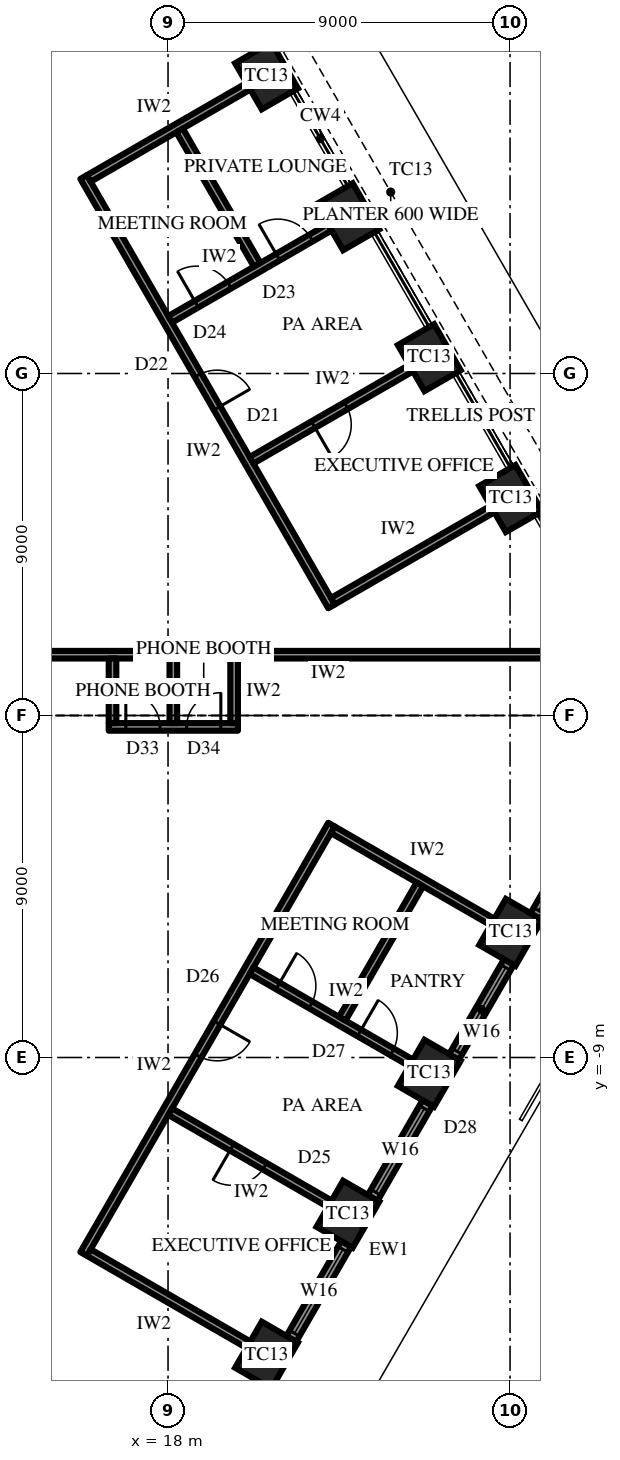
"""IFC4 building model, lengths in metres.
Left out: names, types, materials, properties, quantities, classifications, styles, units other than length and angle.
Written with IfcOpenShell. Run it as: python <this file> out.ifc"""

import sys

from ifc_helpers import new_model, si_unit, direction, frame, frame_2d, origin, origin_2d, place, context, subcontext, project, spatial, rectangle, extrude, element, fill, save


model = new_model("IFC4")
c1 = context("Model", 3, precision=1e-05, world=origin(), true_north=direction((0.0, 1.0)))
c2 = subcontext(c1, "Body", "Model", "MODEL_VIEW")
j1 = project(units=[si_unit("LENGTHUNIT", "METRE"), si_unit("PLANEANGLEUNIT", "RADIAN")], contexts=[c1])
p1 = place(None, origin())
s1 = spatial("IfcSite", under=j1, at=p1, CompositionType="ELEMENT")
p2 = place(p1, origin())
s2 = spatial("IfcBuilding", under=s1, at=p2, CompositionType="ELEMENT")
p3 = place(p2, frame((0.0, 0.0, 319.9)))
s3 = spatial("IfcBuildingStorey", under=s2, at=p3, CompositionType="ELEMENT", Elevation=319.9)
for number, where, z_axis, x_axis in (
    (1, (27.015, 5.708, 0.0), (0.0, 0.0, 1.0), (-0.5, 0.866, 0.0)),
    (2, (24.874, 9.417, 0.0), (0.0, 0.0, 1.0), (-0.5, 0.866, 0.0)),
    (3, (22.733, 13.125, 0.0), (0.0, 0.0, 1.0), (-0.5, 0.866, 0.0)),
    (4, (20.592, 16.833, 0.0), (0.0, 0.0, 1.0), (-0.5, 0.866, 0.0)),
    (5, (20.592, -16.833, 0.0), (0.0, 0.0, 1.0), (0.5, 0.866, 0.0)),
    (6, (22.733, -13.125, 0.0), (0.0, 0.0, 1.0), (0.5, 0.866, 0.0)),
    (7, (24.874, -9.417, 0.0), (0.0, 0.0, 1.0), (0.5, 0.866, 0.0)),
    (8, (27.015, -5.708, 0.0), (0.0, 0.0, 1.0), (0.5, 0.866, 0.0)),
):
    element("IfcColumn", number, at=place(p3, frame(where, z_axis=z_axis, x_axis=x_axis)), inside=s3, PredefinedType="COLUMN", context=c2, shape_type="SweptSolid", body=[
        extrude(rectangle(XDim=1.4, YDim=1.1, at=origin_2d()), origin(), (0.0, 0.0, 1.0), 4.2),
    ])
p4 = place(p3, frame((16.613, -24.425, 0.0), z_axis=(0.0, 0.0, 1.0), x_axis=(0.499997191038, 0.866027025533, 0.0)))
e9 = element("IfcWall", 9, at=p4, inside=s3, PredefinedType="SOLIDWALL", context=c2, shape_type="SweptSolid", body=[
    extrude(rectangle(XDim=25.692, YDim=0.3, at=frame_2d((12.846, 0.0))), origin(), (0.0, 0.0, 1.0), 2.0),
])
p5 = place(p4, frame((0.866, 0.0, 0.6)))
e10 = element("IfcOpeningElement", 10, at=p5, cuts=e9, PredefinedType="OPENING", context=c2, shape_type="SweptSolid", body=[
    extrude(rectangle(XDim=2.55, YDim=1.15, at=frame_2d((1.275, 0.575))), frame((0.0, 0.16, 0.0), z_axis=(0.0, -1.0, 0.0), x_axis=(1.0, 0.0, 0.0)), (0.0, 0.0, 1.0), 0.32),
])
p6 = place(p4, frame((5.148, 0.0, 0.6)))
e11 = element("IfcOpeningElement", 11, at=p6, cuts=e9, PredefinedType="OPENING", context=c2, shape_type="SweptSolid", body=[
    extrude(rectangle(XDim=2.55, YDim=1.15, at=frame_2d((1.275, 0.575))), frame((0.0, 0.16, 0.0), z_axis=(0.0, -1.0, 0.0), x_axis=(1.0, 0.0, 0.0)), (0.0, 0.0, 1.0), 0.32),
])
p7 = place(p4, frame((9.43, 0.0, 0.6)))
e12 = element("IfcOpeningElement", 12, at=p7, cuts=e9, PredefinedType="OPENING", context=c2, shape_type="SweptSolid", body=[
    extrude(rectangle(XDim=2.55, YDim=1.15, at=frame_2d((1.275, 0.575))), frame((0.0, 0.16, 0.0), z_axis=(0.0, -1.0, 0.0), x_axis=(1.0, 0.0, 0.0)), (0.0, 0.0, 1.0), 0.32),
])
p8 = place(p4, frame((13.712, 0.0, 0.6)))
e13 = element("IfcOpeningElement", 13, at=p8, cuts=e9, PredefinedType="OPENING", context=c2, shape_type="SweptSolid", body=[
    extrude(rectangle(XDim=2.55, YDim=1.15, at=frame_2d((1.275, 0.575))), frame((0.0, 0.16, 0.0), z_axis=(0.0, -1.0, 0.0), x_axis=(1.0, 0.0, 0.0)), (0.0, 0.0, 1.0), 0.32),
])
p9 = place(p4, frame((17.994, 0.0, 0.6)))
e14 = element("IfcOpeningElement", 14, at=p9, cuts=e9, PredefinedType="OPENING", context=c2, shape_type="SweptSolid", body=[
    extrude(rectangle(XDim=2.55, YDim=1.15, at=frame_2d((1.275, 0.575))), frame((0.0, 0.16, 0.0), z_axis=(0.0, -1.0, 0.0), x_axis=(1.0, 0.0, 0.0)), (0.0, 0.0, 1.0), 0.32),
])
p10 = place(p4, frame((22.276, 0.0, 0.6)))
e15 = element("IfcOpeningElement", 15, at=p10, cuts=e9, PredefinedType="OPENING", context=c2, shape_type="SweptSolid", body=[
    extrude(rectangle(XDim=2.55, YDim=1.15, at=frame_2d((1.275, 0.575))), frame((0.0, 0.16, 0.0), z_axis=(0.0, -1.0, 0.0), x_axis=(1.0, 0.0, 0.0)), (0.0, 0.0, 1.0), 0.32),
])
p11 = place(p3, frame((22.302, 2.872, 0.0), z_axis=(0.0, 0.0, 1.0), x_axis=(-0.499999460936, 0.866025715013, 0.0)))
e16 = element("IfcWall", 16, at=p11, inside=s3, PredefinedType="PARTITIONING", context=c2, shape_type="SweptSolid", body=[
    extrude(rectangle(XDim=13.046, YDim=0.2, at=frame_2d((6.523, 0.0))), origin(), (0.0, 0.0, 1.0), 4.0),
])
p12 = place(p11, frame((6.023, 0.0, 0.0)))
e17 = element("IfcOpeningElement", 17, at=p12, cuts=e16, PredefinedType="OPENING", context=c2, shape_type="SweptSolid", body=[
    extrude(rectangle(XDim=1.0, YDim=2.2, at=frame_2d((0.5, 1.1))), frame((0.0, 0.11, 0.0), z_axis=(0.0, -1.0, 0.0), x_axis=(1.0, 0.0, 0.0)), (0.0, 0.0, 1.0), 0.22),
])
p13 = place(p3, frame((22.339, 3.008, 0.0), z_axis=(0.0, 0.0, 1.0), x_axis=(0.866019606374, 0.500010041276, 0.0)))
e18 = element("IfcWall", 18, at=p13, inside=s3, PredefinedType="PARTITIONING", context=c2, shape_type="SweptSolid", body=[
    extrude(rectangle(XDim=4.85, YDim=0.2, at=frame_2d((2.425, 0.0))), origin(), (0.0, 0.0, 1.0), 3.082),
])
p14 = place(p3, frame((20.198, 6.717, 0.0), z_axis=(0.0, 0.0, 1.0), x_axis=(0.866019606374, 0.500010041276, 0.0)))
e19 = element("IfcWall", 19, at=p14, inside=s3, PredefinedType="PARTITIONING", context=c2, shape_type="SweptSolid", body=[
    extrude(rectangle(XDim=4.85, YDim=0.2, at=frame_2d((2.425, 0.0))), origin(), (0.0, 0.0, 1.0), 2.992),
])
p15 = place(p14, frame((1.875, 0.0, 0.0)))
e20 = element("IfcOpeningElement", 20, at=p15, cuts=e19, PredefinedType="OPENING", context=c2, shape_type="SweptSolid", body=[
    extrude(rectangle(XDim=1.0, YDim=2.2, at=frame_2d((0.5, 1.1))), frame((0.0, 0.11, 0.0), z_axis=(0.0, -1.0, 0.0), x_axis=(1.0, 0.0, 0.0)), (0.0, 0.0, 1.0), 0.22),
])
p16 = place(p3, frame((18.057, 10.425, 0.0), z_axis=(0.0, 0.0, 1.0), x_axis=(0.866019606374, 0.500010041276, 0.0)))
e21 = element("IfcWall", 21, at=p16, inside=s3, PredefinedType="PARTITIONING", context=c2, shape_type="SweptSolid", body=[
    extrude(rectangle(XDim=4.85, YDim=0.2, at=frame_2d((2.425, 0.0))), origin(), (0.0, 0.0, 1.0), 3.082),
])
p17 = place(p16, frame((0.8, 0.0, 0.0)))
e22 = element("IfcOpeningElement", 22, at=p17, cuts=e21, PredefinedType="OPENING", context=c2, shape_type="SweptSolid", body=[
    extrude(rectangle(XDim=1.0, YDim=2.2, at=frame_2d((0.5, 1.1))), frame((0.0, 0.11, 0.0), z_axis=(0.0, -1.0, 0.0), x_axis=(1.0, 0.0, 0.0)), (0.0, 0.0, 1.0), 0.22),
])
p18 = place(p16, frame((3.275, 0.0, 0.0)))
e23 = element("IfcOpeningElement", 23, at=p18, cuts=e21, PredefinedType="OPENING", context=c2, shape_type="SweptSolid", body=[
    extrude(rectangle(XDim=1.0, YDim=2.2, at=frame_2d((0.5, 1.1))), frame((0.0, 0.11, 0.0), z_axis=(0.0, -1.0, 0.0), x_axis=(1.0, 0.0, 0.0)), (0.0, 0.0, 1.0), 0.22),
])
p19 = place(p3, frame((15.916, 14.133, 0.0), z_axis=(0.0, 0.0, 1.0), x_axis=(0.866032190624, 0.499988244665, 0.0)))
e24 = element("IfcWall", 24, at=p19, inside=s3, PredefinedType="PARTITIONING", context=c2, shape_type="SweptSolid", body=[
    extrude(rectangle(XDim=4.85, YDim=0.2, at=frame_2d((2.425, 0.0))), origin(), (0.0, 0.0, 1.0), 3.082),
])
p20 = place(p3, frame((20.345, 11.862, 0.0), z_axis=(0.0, 0.0, 1.0), x_axis=(-0.499998569178, 0.866026229868, 0.0)))
e25 = element("IfcWall", 25, at=p20, inside=s3, PredefinedType="PARTITIONING", context=c2, shape_type="SweptSolid", body=[
    extrude(rectangle(XDim=4.082, YDim=0.2, at=frame_2d((2.041, 0.0))), origin(), (0.0, 0.0, 1.0), 4.0),
])
p21 = place(p3, frame((15.779, -14.17, 0.0), z_axis=(0.0, 0.0, 1.0), x_axis=(0.499999460936, 0.866025715013, 0.0)))
e26 = element("IfcWall", 26, at=p21, inside=s3, PredefinedType="PARTITIONING", context=c2, shape_type="SweptSolid", body=[
    extrude(rectangle(XDim=13.046, YDim=0.2, at=frame_2d((6.523, 0.0))), origin(), (0.0, 0.0, 1.0), 4.0),
])
p22 = place(p21, frame((6.023, 0.0, 0.0)))
e27 = element("IfcOpeningElement", 27, at=p22, cuts=e26, PredefinedType="OPENING", context=c2, shape_type="SweptSolid", body=[
    extrude(rectangle(XDim=1.0, YDim=2.2, at=frame_2d((0.5, 1.1))), frame((0.0, 0.11, 0.0), z_axis=(0.0, -1.0, 0.0), x_axis=(1.0, 0.0, 0.0)), (0.0, 0.0, 1.0), 0.22),
])
p23 = place(p3, frame((15.916, -14.133, 0.0), z_axis=(0.0, 0.0, 1.0), x_axis=(0.866032190624, -0.499988244665, 0.0)))
e28 = element("IfcWall", 28, at=p23, inside=s3, PredefinedType="PARTITIONING", context=c2, shape_type="SweptSolid", body=[
    extrude(rectangle(XDim=4.85, YDim=0.2, at=frame_2d((2.425, 0.0))), origin(), (0.0, 0.0, 1.0), 3.082),
])
p24 = place(p3, frame((18.057, -10.425, 0.0), z_axis=(0.0, 0.0, 1.0), x_axis=(0.866019606374, -0.500010041276, 0.0)))
e29 = element("IfcWall", 29, at=p24, inside=s3, PredefinedType="PARTITIONING", context=c2, shape_type="SweptSolid", body=[
    extrude(rectangle(XDim=4.85, YDim=0.2, at=frame_2d((2.425, 0.0))), origin(), (0.0, 0.0, 1.0), 3.082),
])
p25 = place(p24, frame((1.875, 0.0, 0.0)))
e30 = element("IfcOpeningElement", 30, at=p25, cuts=e29, PredefinedType="OPENING", context=c2, shape_type="SweptSolid", body=[
    extrude(rectangle(XDim=1.0, YDim=2.2, at=frame_2d((0.5, 1.1))), frame((0.0, 0.11, 0.0), z_axis=(0.0, -1.0, 0.0), x_axis=(1.0, 0.0, 0.0)), (0.0, 0.0, 1.0), 0.22),
])
p26 = place(p3, frame((20.198, -6.717, 0.0), z_axis=(0.0, 0.0, 1.0), x_axis=(0.866019606374, -0.500010041276, 0.0)))
e31 = element("IfcWall", 31, at=p26, inside=s3, PredefinedType="PARTITIONING", context=c2, shape_type="SweptSolid", body=[
    extrude(rectangle(XDim=4.85, YDim=0.2, at=frame_2d((2.425, 0.0))), origin(), (0.0, 0.0, 1.0), 2.992),
])
p27 = place(p26, frame((0.8, 0.0, 0.0)))
e32 = element("IfcOpeningElement", 32, at=p27, cuts=e31, PredefinedType="OPENING", context=c2, shape_type="SweptSolid", body=[
    extrude(rectangle(XDim=1.0, YDim=2.2, at=frame_2d((0.5, 1.1))), frame((0.0, 0.11, 0.0), z_axis=(0.0, -1.0, 0.0), x_axis=(1.0, 0.0, 0.0)), (0.0, 0.0, 1.0), 0.22),
])
p28 = place(p26, frame((3.275, 0.0, 0.0)))
e33 = element("IfcOpeningElement", 33, at=p28, cuts=e31, PredefinedType="OPENING", context=c2, shape_type="SweptSolid", body=[
    extrude(rectangle(XDim=1.0, YDim=2.2, at=frame_2d((0.5, 1.1))), frame((0.0, 0.11, 0.0), z_axis=(0.0, -1.0, 0.0), x_axis=(1.0, 0.0, 0.0)), (0.0, 0.0, 1.0), 0.22),
])
p29 = place(p3, frame((22.339, -3.008, 0.0), z_axis=(0.0, 0.0, 1.0), x_axis=(0.866019606374, -0.500010041276, 0.0)))
e34 = element("IfcWall", 34, at=p29, inside=s3, PredefinedType="PARTITIONING", context=c2, shape_type="SweptSolid", body=[
    extrude(rectangle(XDim=4.85, YDim=0.2, at=frame_2d((2.425, 0.0))), origin(), (0.0, 0.0, 1.0), 3.082),
])
p30 = place(p3, frame((22.586, -7.98, 0.0), z_axis=(0.0, 0.0, 1.0), x_axis=(0.499998569178, 0.866026229868, 0.0)))
e35 = element("IfcWall", 35, at=p30, inside=s3, PredefinedType="PARTITIONING", context=c2, shape_type="SweptSolid", body=[
    extrude(rectangle(XDim=4.082, YDim=0.2, at=frame_2d((2.041, 0.0))), origin(), (0.0, 0.0, 1.0), 4.0),
])
p31 = place(p3, frame((12.425, 1.6, 0.0), z_axis=(0.0, 0.0, 1.0), x_axis=(1.0, 0.0, 0.0)))
e36 = element("IfcWall", 36, at=p31, inside=s3, PredefinedType="PARTITIONING", context=c2, shape_type="SweptSolid", body=[
    extrude(rectangle(XDim=16.327, YDim=0.2, at=frame_2d((8.164, 0.0))), origin(), (0.0, 0.0, 1.0), 4.0),
])
p32 = place(p31, frame((1.133, 0.0, 0.0)))
e37 = element("IfcOpeningElement", 37, at=p32, cuts=e36, PredefinedType="OPENING", context=c2, shape_type="SweptSolid", body=[
    extrude(rectangle(XDim=1.0, YDim=2.2, at=frame_2d((0.5, 1.1))), frame((0.0, 0.11, 0.0), z_axis=(0.0, -1.0, 0.0), x_axis=(1.0, 0.0, 0.0)), (0.0, 0.0, 1.0), 0.22),
])
p33 = place(p3, frame((16.439, -0.3, 0.0), z_axis=(0.0, 0.0, 1.0), x_axis=(1.0, 0.0, 0.0)))
e38 = element("IfcWall", 38, at=p33, inside=s3, PredefinedType="PARTITIONING", context=c2, shape_type="SweptSolid", body=[
    extrude(rectangle(XDim=3.4, YDim=0.2, at=frame_2d((1.7, 0.0))), origin(), (0.0, 0.0, 1.0), 4.0),
])
p34 = place(p33, frame((0.45, 0.0, 0.0)))
e39 = element("IfcOpeningElement", 39, at=p34, cuts=e38, PredefinedType="OPENING", context=c2, shape_type="SweptSolid", body=[
    extrude(rectangle(XDim=0.9, YDim=2.2, at=frame_2d((0.45, 1.1))), frame((0.0, 0.11, 0.0), z_axis=(0.0, -1.0, 0.0), x_axis=(1.0, 0.0, 0.0)), (0.0, 0.0, 1.0), 0.22),
])
p35 = place(p33, frame((2.05, 0.0, 0.0)))
e40 = element("IfcOpeningElement", 40, at=p35, cuts=e38, PredefinedType="OPENING", context=c2, shape_type="SweptSolid", body=[
    extrude(rectangle(XDim=0.9, YDim=2.2, at=frame_2d((0.45, 1.1))), frame((0.0, 0.11, 0.0), z_axis=(0.0, -1.0, 0.0), x_axis=(1.0, 0.0, 0.0)), (0.0, 0.0, 1.0), 0.22),
])
for number, where, z_axis, x_axis in (
    (41, (16.54, 1.5, 0.0), (0.0, 0.0, 1.0), (0.0, -1.0, 0.0)),
    (42, (18.139, 1.5, 0.0), (0.0, 0.0, 1.0), (0.0, -1.0, 0.0)),
    (43, (19.74, 1.5, 0.0), (0.0, 0.0, 1.0), (0.0, -1.0, 0.0)),
):
    element("IfcWall", number, at=place(p3, frame(where, z_axis=z_axis, x_axis=x_axis)), inside=s3, PredefinedType="PARTITIONING", context=c2, shape_type="SweptSolid", body=[
        extrude(rectangle(XDim=1.7, YDim=0.2, at=frame_2d((0.85, 0.0))), origin(), (0.0, 0.0, 1.0), 4.0),
    ])
p36 = place(p7, origin())
e44 = element("IfcWindow", 44, at=p36, inside=s3, PartitioningType="SINGLE_PANEL", PredefinedType="WINDOW", context=c2, shape_type="SweptSolid", body=[
    extrude(rectangle(XDim=2.55, YDim=1.15, at=frame_2d((1.275, 0.575))), frame((0.0, 0.03, 0.0), z_axis=(0.0, -1.0, 0.0), x_axis=(1.0, 0.0, 0.0)), (0.0, 0.0, 1.0), 0.06),
])
fill(e12, e44)
p37 = place(p8, origin())
e45 = element("IfcWindow", 45, at=p37, inside=s3, PartitioningType="SINGLE_PANEL", PredefinedType="WINDOW", context=c2, shape_type="SweptSolid", body=[
    extrude(rectangle(XDim=2.55, YDim=1.15, at=frame_2d((1.275, 0.575))), frame((0.0, 0.03, 0.0), z_axis=(0.0, -1.0, 0.0), x_axis=(1.0, 0.0, 0.0)), (0.0, 0.0, 1.0), 0.06),
])
fill(e13, e45)
p38 = place(p9, origin())
e46 = element("IfcWindow", 46, at=p38, inside=s3, PartitioningType="SINGLE_PANEL", PredefinedType="WINDOW", context=c2, shape_type="SweptSolid", body=[
    extrude(rectangle(XDim=2.55, YDim=1.15, at=frame_2d((1.275, 0.575))), frame((0.0, 0.03, 0.0), z_axis=(0.0, -1.0, 0.0), x_axis=(1.0, 0.0, 0.0)), (0.0, 0.0, 1.0), 0.06),
])
fill(e14, e46)
p39 = place(p10, origin())
e47 = element("IfcWindow", 47, at=p39, inside=s3, PartitioningType="SINGLE_PANEL", PredefinedType="WINDOW", context=c2, shape_type="SweptSolid", body=[
    extrude(rectangle(XDim=2.55, YDim=1.15, at=frame_2d((1.275, 0.575))), frame((0.0, 0.03, 0.0), z_axis=(0.0, -1.0, 0.0), x_axis=(1.0, 0.0, 0.0)), (0.0, 0.0, 1.0), 0.06),
])
fill(e15, e47)
p40 = place(p15, frame((1.0, 0.0, 0.0), z_axis=(0.0, 0.0, 1.0), x_axis=(-1.0, 0.0, 0.0)))
e48 = element("IfcDoor", 48, at=p40, inside=s3, OperationType="SINGLE_SWING_LEFT", PredefinedType="DOOR", context=c2, shape_type="SweptSolid", body=[
    extrude(rectangle(XDim=1.0, YDim=2.2, at=frame_2d((0.5, 1.1))), frame((0.0, 0.025, 0.0), z_axis=(0.0, -1.0, 0.0), x_axis=(1.0, 0.0, 0.0)), (0.0, 0.0, 1.0), 0.05),
])
fill(e20, e48)
p41 = place(p12, frame((1.0, 0.0, 0.0), z_axis=(0.0, 0.0, 1.0), x_axis=(-1.0, 0.0, 0.0)))
e49 = element("IfcDoor", 49, at=p41, inside=s3, OperationType="SINGLE_SWING_LEFT", PredefinedType="DOOR", context=c2, shape_type="SweptSolid", body=[
    extrude(rectangle(XDim=1.0, YDim=2.2, at=frame_2d((0.5, 1.1))), frame((0.0, 0.025, 0.0), z_axis=(0.0, -1.0, 0.0), x_axis=(1.0, 0.0, 0.0)), (0.0, 0.0, 1.0), 0.05),
])
fill(e17, e49)
p42 = place(p17, origin())
e50 = element("IfcDoor", 50, at=p42, inside=s3, OperationType="SINGLE_SWING_RIGHT", PredefinedType="DOOR", context=c2, shape_type="SweptSolid", body=[
    extrude(rectangle(XDim=1.0, YDim=2.2, at=frame_2d((0.5, 1.1))), frame((0.0, 0.025, 0.0), z_axis=(0.0, -1.0, 0.0), x_axis=(1.0, 0.0, 0.0)), (0.0, 0.0, 1.0), 0.05),
])
fill(e22, e50)
p43 = place(p18, origin())
e51 = element("IfcDoor", 51, at=p43, inside=s3, OperationType="SINGLE_SWING_RIGHT", PredefinedType="DOOR", context=c2, shape_type="SweptSolid", body=[
    extrude(rectangle(XDim=1.0, YDim=2.2, at=frame_2d((0.5, 1.1))), frame((0.0, 0.025, 0.0), z_axis=(0.0, -1.0, 0.0), x_axis=(1.0, 0.0, 0.0)), (0.0, 0.0, 1.0), 0.05),
])
fill(e23, e51)
p44 = place(p25, frame((1.0, 0.0, 0.0), z_axis=(0.0, 0.0, 1.0), x_axis=(-1.0, 0.0, 0.0)))
e52 = element("IfcDoor", 52, at=p44, inside=s3, OperationType="SINGLE_SWING_LEFT", PredefinedType="DOOR", context=c2, shape_type="SweptSolid", body=[
    extrude(rectangle(XDim=1.0, YDim=2.2, at=frame_2d((0.5, 1.1))), frame((0.0, 0.025, 0.0), z_axis=(0.0, -1.0, 0.0), x_axis=(1.0, 0.0, 0.0)), (0.0, 0.0, 1.0), 0.05),
])
fill(e30, e52)
p45 = place(p22, frame((1.0, 0.0, 0.0), z_axis=(0.0, 0.0, 1.0), x_axis=(-1.0, 0.0, 0.0)))
e53 = element("IfcDoor", 53, at=p45, inside=s3, OperationType="SINGLE_SWING_RIGHT", PredefinedType="DOOR", context=c2, shape_type="SweptSolid", body=[
    extrude(rectangle(XDim=1.0, YDim=2.2, at=frame_2d((0.5, 1.1))), frame((0.0, 0.025, 0.0), z_axis=(0.0, -1.0, 0.0), x_axis=(1.0, 0.0, 0.0)), (0.0, 0.0, 1.0), 0.05),
])
fill(e27, e53)
p46 = place(p27, origin())
e54 = element("IfcDoor", 54, at=p46, inside=s3, OperationType="SINGLE_SWING_RIGHT", PredefinedType="DOOR", context=c2, shape_type="SweptSolid", body=[
    extrude(rectangle(XDim=1.0, YDim=2.2, at=frame_2d((0.5, 1.1))), frame((0.0, 0.025, 0.0), z_axis=(0.0, -1.0, 0.0), x_axis=(1.0, 0.0, 0.0)), (0.0, 0.0, 1.0), 0.05),
])
fill(e32, e54)
p47 = place(p28, origin())
e55 = element("IfcDoor", 55, at=p47, inside=s3, OperationType="SINGLE_SWING_RIGHT", PredefinedType="DOOR", context=c2, shape_type="SweptSolid", body=[
    extrude(rectangle(XDim=1.0, YDim=2.2, at=frame_2d((0.5, 1.1))), frame((0.0, 0.025, 0.0), z_axis=(0.0, -1.0, 0.0), x_axis=(1.0, 0.0, 0.0)), (0.0, 0.0, 1.0), 0.05),
])
fill(e33, e55)
p48 = place(p34, origin())
e56 = element("IfcDoor", 56, at=p48, inside=s3, OperationType="SINGLE_SWING_RIGHT", PredefinedType="DOOR", context=c2, shape_type="SweptSolid", body=[
    extrude(rectangle(XDim=0.9, YDim=2.2, at=frame_2d((0.45, 1.1))), frame((0.0, 0.025, 0.0), z_axis=(0.0, -1.0, 0.0), x_axis=(1.0, 0.0, 0.0)), (0.0, 0.0, 1.0), 0.05),
])
fill(e39, e56)
p49 = place(p35, origin())
e57 = element("IfcDoor", 57, at=p49, inside=s3, OperationType="SINGLE_SWING_LEFT", PredefinedType="DOOR", context=c2, shape_type="SweptSolid", body=[
    extrude(rectangle(XDim=0.9, YDim=2.2, at=frame_2d((0.45, 1.1))), frame((0.0, 0.025, 0.0), z_axis=(0.0, -1.0, 0.0), x_axis=(1.0, 0.0, 0.0)), (0.0, 0.0, 1.0), 0.05),
])
fill(e40, e57)
save(model, sys.argv[1])
